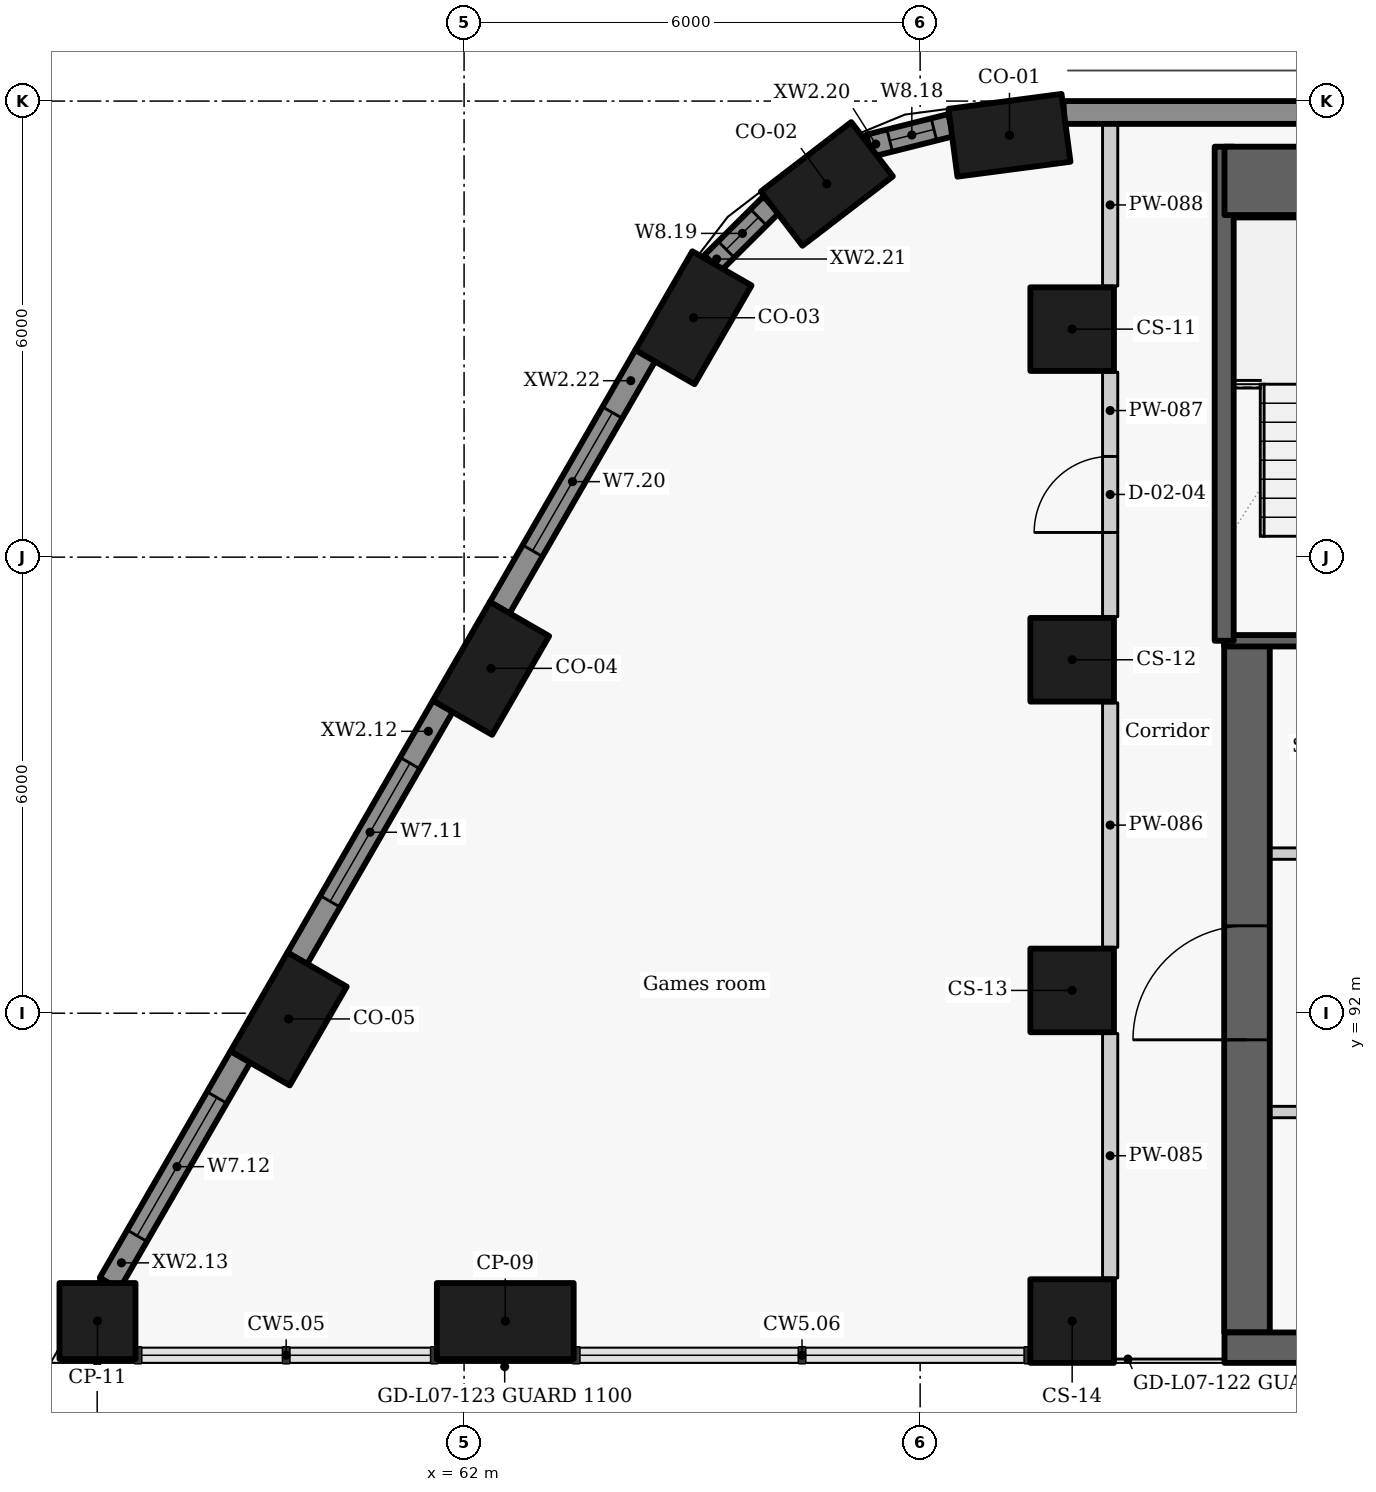
"""IFC4 building model, lengths in metres.
Left out: names, types, materials, properties, quantities, classifications, styles, units other than length and angle.
Written with IfcOpenShell. Run it as: python <this file> out.ifc"""

import sys

from ifc_helpers import new_model, si_unit, direction, frame, frame_2d, origin, origin_2d, place, context, subcontext, project, spatial, rectangle, extrude, element, fill, save


model = new_model("IFC4")
c1 = context("Model", 3, precision=1e-05, world=origin(), true_north=direction((0.0, 1.0)))
c2 = subcontext(c1, "Body", "Model", "MODEL_VIEW")
j1 = project(units=[si_unit("LENGTHUNIT", "METRE"), si_unit("PLANEANGLEUNIT", "RADIAN")], contexts=[c1])
p1 = place(None, origin())
s1 = spatial("IfcSite", under=j1, at=p1, CompositionType="ELEMENT")
p2 = place(p1, origin())
s2 = spatial("IfcBuilding", under=s1, at=p2, CompositionType="ELEMENT")
p3 = place(p2, frame((0.0, 0.0, 31.5)))
s3 = spatial("IfcBuildingStorey", under=s2, at=p3, CompositionType="ELEMENT", Elevation=31.5)
for number, where, z_axis, x_axis in (
    (1, (69.175, 103.55, 0.0), (0.0, 0.0, 1.0), (-0.991, -0.131, 0.0)),
    (2, (66.773, 102.91, 0.0), (0.0, 0.0, 1.0), (-0.793, -0.609, 0.0)),
    (3, (65.018, 101.149, 0.0), (0.0, 0.0, 1.0), (-0.5, -0.866, 0.0)),
    (4, (62.354, 96.537, 0.0), (0.0, 0.0, 1.0), (-0.5, -0.866, 0.0)),
    (5, (59.692, 91.925, 0.0), (0.0, 0.0, 1.0), (-0.5, -0.866, 0.0)),
):
    element("IfcColumn", number, at=place(p3, frame(where, z_axis=z_axis, x_axis=x_axis)), inside=s3, PredefinedType="COLUMN", context=c2, shape_type="SweptSolid", body=[
        extrude(rectangle(XDim=1.5, YDim=0.9, at=origin_2d()), origin(), (0.0, 0.0, 1.0), 3.3),
    ])
for number, where, z_axis, x_axis in (
    (6, (70.0, 101.0, 0.0), (0.0, 0.0, 1.0), (0.0, -1.0, 0.0)),
    (7, (70.0, 96.65, 0.0), (0.0, 0.0, 1.0), (0.0, -1.0, 0.0)),
    (8, (70.0, 92.3, 0.0), (0.0, 0.0, 1.0), (0.0, -1.0, 0.0)),
    (9, (70.0, 87.95, 0.0), (0.0, 0.0, 1.0), (0.0, -1.0, 0.0)),
):
    element("IfcColumn", number, at=place(p3, frame(where, z_axis=z_axis, x_axis=x_axis)), inside=s3, PredefinedType="COLUMN", context=c2, shape_type="SweptSolid", body=[
        extrude(rectangle(XDim=1.1, YDim=1.1, at=origin_2d()), origin(), (0.0, 0.0, 1.0), 3.3),
    ])
p4 = place(p3, frame((62.542, 87.95, 0.0), z_axis=(0.0, 0.0, 1.0), x_axis=(1.0, 0.0, 0.0)))
e10 = element("IfcColumn", 10, at=p4, inside=s3, PredefinedType="COLUMN", context=c2, shape_type="SweptSolid", body=[
    extrude(rectangle(XDim=1.8, YDim=1.0, at=origin_2d()), origin(), (0.0, 0.0, 1.0), 3.3),
])
p5 = place(p3, frame((57.177, 87.95, 0.0), z_axis=(0.0, 0.0, 1.0), x_axis=(1.0, 0.0, 0.0)))
e11 = element("IfcColumn", 11, at=p5, inside=s3, PredefinedType="COLUMN", context=c2, shape_type="SweptSolid", body=[
    extrude(rectangle(XDim=1.0, YDim=1.0, at=origin_2d()), origin(), (0.0, 0.0, 1.0), 3.3),
])
p6 = place(p3, frame((61.722, 96.041, 0.0), z_axis=(0.0, 0.0, 1.0), x_axis=(-0.500001735503, -0.866024401789, 0.0)))
e12 = element("IfcWall", 12, at=p6, inside=s3, PredefinedType="SOLIDWALL", context=c2, shape_type="SweptSolid", body=[
    extrude(rectangle(XDim=3.834, YDim=0.3, at=frame_2d((1.917, 0.0))), origin(), (0.0, 0.0, 1.0), 2.425),
])
p7 = place(p6, frame((0.867, 0.0, 0.9)))
e13 = element("IfcOpeningElement", 13, at=p7, cuts=e12, PredefinedType="OPENING", context=c2, shape_type="SweptSolid", body=[
    extrude(rectangle(XDim=2.1, YDim=1.1, at=frame_2d((1.05, 0.55))), frame((0.0, 0.16, 0.0), z_axis=(0.0, -1.0, 0.0), x_axis=(1.0, 0.0, 0.0)), (0.0, 0.0, 1.0), 0.32),
])
p8 = place(p3, frame((59.059, 91.429, 0.0), z_axis=(0.0, 0.0, 1.0), x_axis=(-0.500035437112, -0.866004943191, 0.0)))
e14 = element("IfcWall", 14, at=p8, inside=s3, PredefinedType="SOLIDWALL", context=c2, shape_type="SweptSolid", body=[
    extrude(rectangle(XDim=3.444, YDim=0.3, at=frame_2d((1.722, 0.0))), origin(), (0.0, 0.0, 1.0), 2.425),
])
p9 = place(p8, frame((0.621, 0.0, 0.9)))
e15 = element("IfcOpeningElement", 15, at=p9, cuts=e14, PredefinedType="OPENING", context=c2, shape_type="SweptSolid", body=[
    extrude(rectangle(XDim=2.1, YDim=1.1, at=frame_2d((1.05, 0.55))), frame((0.0, 0.16, 0.0), z_axis=(0.0, -1.0, 0.0), x_axis=(1.0, 0.0, 0.0)), (0.0, 0.0, 1.0), 0.32),
])
p10 = place(p3, frame((90.079, 103.85, 0.0), z_axis=(0.0, 0.0, 1.0), x_axis=(-1.0, 0.0, 0.0)))
e16 = element("IfcWall", 16, at=p10, inside=s3, PredefinedType="SOLIDWALL", context=c2, shape_type="SweptSolid", body=[
    extrude(rectangle(XDim=20.19, YDim=0.3, at=frame_2d((10.095, 0.0))), origin(), (0.0, 0.0, 1.0), 2.425),
])
p11 = place(p3, frame((68.405, 103.683, 0.0), z_axis=(0.0, 0.0, 1.0), x_axis=(-0.969766298956, -0.244035500304, 0.0)))
e17 = element("IfcWall", 17, at=p11, inside=s3, PredefinedType="SOLIDWALL", context=c2, shape_type="SweptSolid", body=[
    extrude(rectangle(XDim=1.111, YDim=0.3, at=frame_2d((0.555, 0.0))), origin(), (0.0, 0.0, 1.0), 2.425),
])
p12 = place(p11, frame((0.231, 0.0, 0.9)))
e18 = element("IfcOpeningElement", 18, at=p12, cuts=e17, PredefinedType="OPENING", context=c2, shape_type="SweptSolid", body=[
    extrude(rectangle(XDim=0.6, YDim=1.1, at=frame_2d((0.3, 0.55))), frame((0.0, 0.16, 0.0), z_axis=(0.0, -1.0, 0.0), x_axis=(1.0, 0.0, 0.0)), (0.0, 0.0, 1.0), 0.32),
])
p13 = place(p3, frame((66.042, 102.637, 0.0), z_axis=(0.0, 0.0, 1.0), x_axis=(-0.708892395813, -0.705316646024, 0.0)))
e19 = element("IfcWall", 19, at=p13, inside=s3, PredefinedType="SOLIDWALL", context=c2, shape_type="SweptSolid", body=[
    extrude(rectangle(XDim=1.093, YDim=0.3, at=frame_2d((0.546, 0.0))), origin(), (0.0, 0.0, 1.0), 2.425),
])
p14 = place(p13, frame((0.236, 0.0, 0.9)))
e20 = element("IfcOpeningElement", 20, at=p14, cuts=e19, PredefinedType="OPENING", context=c2, shape_type="SweptSolid", body=[
    extrude(rectangle(XDim=0.6, YDim=1.1, at=frame_2d((0.3, 0.55))), frame((0.0, 0.16, 0.0), z_axis=(0.0, -1.0, 0.0), x_axis=(1.0, 0.0, 0.0)), (0.0, 0.0, 1.0), 0.32),
])
p15 = place(p3, frame((64.385, 100.654, 0.0), z_axis=(0.0, 0.0, 1.0), x_axis=(-0.499974163209, -0.866040320149, 0.0)))
e21 = element("IfcWall", 21, at=p15, inside=s3, PredefinedType="SOLIDWALL", context=c2, shape_type="SweptSolid", body=[
    extrude(rectangle(XDim=3.834, YDim=0.3, at=frame_2d((1.917, 0.0))), origin(), (0.0, 0.0, 1.0), 2.425),
])
p16 = place(p15, frame((0.867, 0.0, 0.9)))
e22 = element("IfcOpeningElement", 22, at=p16, cuts=e21, PredefinedType="OPENING", context=c2, shape_type="SweptSolid", body=[
    extrude(rectangle(XDim=2.1, YDim=1.1, at=frame_2d((1.05, 0.55))), frame((0.0, 0.16, 0.0), z_axis=(0.0, -1.0, 0.0), x_axis=(1.0, 0.0, 0.0)), (0.0, 0.0, 1.0), 0.32),
])
p17 = place(p3, frame((74.6, 90.7, 0.0), z_axis=(0.0, 0.0, 1.0), x_axis=(-1.0, 0.0, 0.0)))
e23 = element("IfcWall", 23, at=p17, inside=s3, PredefinedType="PARTITIONING", context=c2, shape_type="SweptSolid", body=[
    extrude(rectangle(XDim=2.6, YDim=0.15, at=frame_2d((1.3, 0.0))), origin(), (0.0, 0.0, 1.0), 3.025),
])
p18 = place(p17, frame((0.525, 0.0, 0.0)))
e24 = element("IfcOpeningElement", 24, at=p18, cuts=e23, PredefinedType="OPENING", context=c2, shape_type="SweptSolid", body=[
    extrude(rectangle(XDim=0.9, YDim=2.1, at=frame_2d((0.45, 1.05))), frame((0.0, 0.085, 0.0), z_axis=(0.0, -1.0, 0.0), x_axis=(1.0, 0.0, 0.0)), (0.0, 0.0, 1.0), 0.17),
])
p19 = place(p3, frame((72.3, 87.8, -0.275), z_axis=(0.0, 0.0, 1.0), x_axis=(0.0, 1.0, 0.0)))
e25 = element("IfcWall", 25, at=p19, inside=s3, PredefinedType="SHEAR", context=c2, shape_type="SweptSolid", body=[
    extrude(rectangle(XDim=9.1, YDim=0.6, at=frame_2d((4.55, 0.0))), origin(), (0.0, 0.0, 1.0), 3.3),
])
p20 = place(p19, frame((3.85, 0.0, 0.275)))
e26 = element("IfcOpeningElement", 26, at=p20, cuts=e25, PredefinedType="OPENING", context=c2, shape_type="SweptSolid", body=[
    extrude(rectangle(XDim=1.5, YDim=2.1, at=frame_2d((0.75, 1.05))), frame((0.0, 0.31, 0.0), z_axis=(0.0, -1.0, 0.0), x_axis=(1.0, 0.0, 0.0)), (0.0, 0.0, 1.0), 0.62),
])
p21 = place(p3, frame((72.0, 94.1, 0.0), z_axis=(0.0, 0.0, 1.0), x_axis=(1.0, 0.0, 0.0)))
e27 = element("IfcWall", 27, at=p21, inside=s3, PredefinedType="PARTITIONING", context=c2, shape_type="SweptSolid", body=[
    extrude(rectangle(XDim=2.603, YDim=0.15, at=frame_2d((1.302, 0.0))), origin(), (0.0, 0.0, 1.0), 3.025),
])
p22 = place(p21, frame((1.075, 0.0, 0.0)))
e28 = element("IfcOpeningElement", 28, at=p22, cuts=e27, PredefinedType="OPENING", context=c2, shape_type="SweptSolid", body=[
    extrude(rectangle(XDim=1.1, YDim=2.1, at=frame_2d((0.55, 1.05))), frame((0.0, 0.085, 0.0), z_axis=(0.0, -1.0, 0.0), x_axis=(1.0, 0.0, 0.0)), (0.0, 0.0, 1.0), 0.17),
])
p23 = place(p3, frame((74.6, 96.9, -0.275), z_axis=(0.0, 0.0, 1.0), x_axis=(-1.0, 0.0, 0.0)))
e29 = element("IfcWall", 29, at=p23, inside=s3, PredefinedType="SHEAR", context=c2, shape_type="SweptSolid", body=[
    extrude(rectangle(XDim=2.6, YDim=0.15, at=frame_2d((1.3, 0.0))), origin(), (0.0, 0.0, 1.0), 3.3),
])
p24 = place(p23, frame((0.37, 0.0, 0.275)))
e30 = element("IfcOpeningElement", 30, at=p24, cuts=e29, PredefinedType="OPENING", context=c2, shape_type="SweptSolid", body=[
    extrude(rectangle(XDim=1.1, YDim=2.1, at=frame_2d((0.55, 1.05))), frame((0.0, 0.085, 0.0), z_axis=(0.0, -1.0, 0.0), x_axis=(1.0, 0.0, 0.0)), (0.0, 0.0, 1.0), 0.17),
])
p25 = place(p3, frame((72.0, 96.9, -0.275), z_axis=(0.0, 0.0, 1.0), x_axis=(0.0, 1.0, 0.0)))
e31 = element("IfcWall", 31, at=p25, inside=s3, PredefinedType="SHEAR", context=c2, shape_type="SweptSolid", body=[
    extrude(rectangle(XDim=6.5, YDim=0.25, at=frame_2d((3.25, 0.0))), origin(), (0.0, 0.0, 1.0), 3.3),
])
p26 = place(p3, frame((70.5, 88.517, 0.0), z_axis=(0.0, 0.0, 1.0), x_axis=(0.0, 1.0, 0.0)))
e32 = element("IfcWall", 32, at=p26, inside=s3, PredefinedType="PARTITIONING", context=c2, shape_type="SweptSolid", body=[
    extrude(rectangle(XDim=3.216, YDim=0.2, at=frame_2d((1.608, 0.0))), origin(), (0.0, 0.0, 1.0), 3.025),
])
p27 = place(p3, frame((70.5, 92.867, 0.0), z_axis=(0.0, 0.0, 1.0), x_axis=(0.0, 1.0, 0.0)))
e33 = element("IfcWall", 33, at=p27, inside=s3, PredefinedType="PARTITIONING", context=c2, shape_type="SweptSolid", body=[
    extrude(rectangle(XDim=3.216, YDim=0.2, at=frame_2d((1.608, 0.0))), origin(), (0.0, 0.0, 1.0), 3.025),
])
p28 = place(p3, frame((70.5, 97.217, 0.0), z_axis=(0.0, 0.0, 1.0), x_axis=(0.0, 1.0, 0.0)))
e34 = element("IfcWall", 34, at=p28, inside=s3, PredefinedType="PARTITIONING", context=c2, shape_type="SweptSolid", body=[
    extrude(rectangle(XDim=3.216, YDim=0.2, at=frame_2d((1.608, 0.0))), origin(), (0.0, 0.0, 1.0), 3.025),
])
p29 = place(p28, frame((1.108, 0.0, 0.0)))
e35 = element("IfcOpeningElement", 35, at=p29, cuts=e34, PredefinedType="OPENING", context=c2, shape_type="SweptSolid", body=[
    extrude(rectangle(XDim=1.0, YDim=2.1, at=frame_2d((0.5, 1.05))), frame((0.0, 0.11, 0.0), z_axis=(0.0, -1.0, 0.0), x_axis=(1.0, 0.0, 0.0)), (0.0, 0.0, 1.0), 0.22),
])
p30 = place(p3, frame((70.5, 101.567, 0.0), z_axis=(0.0, 0.0, 1.0), x_axis=(0.0, 1.0, 0.0)))
e36 = element("IfcWall", 36, at=p30, inside=s3, PredefinedType="PARTITIONING", context=c2, shape_type="SweptSolid", body=[
    extrude(rectangle(XDim=2.133, YDim=0.2, at=frame_2d((1.066, 0.0))), origin(), (0.0, 0.0, 1.0), 3.025),
])
p31 = place(p3, frame((72.004, 87.6, -0.275), z_axis=(0.0, 0.0, 1.0), x_axis=(1.0, 0.0, 0.0)))
e37 = element("IfcWall", 37, at=p31, inside=s3, PredefinedType="SHEAR", context=c2, shape_type="SweptSolid", body=[
    extrude(rectangle(XDim=15.992, YDim=0.4, at=frame_2d((7.996, 0.0))), origin(), (0.0, 0.0, 1.0), 3.3),
])
p32 = place(p3, frame((72.004, 102.95, -0.275), z_axis=(0.0, 0.0, 1.0), x_axis=(1.0, 0.0, 0.0)))
e38 = element("IfcWall", 38, at=p32, inside=s3, PredefinedType="SHEAR", context=c2, shape_type="SweptSolid", body=[
    extrude(rectangle(XDim=15.992, YDim=0.9, at=frame_2d((7.996, 0.0))), origin(), (0.0, 0.0, 1.0), 3.3),
])
p33 = place(p7, origin())
e39 = element("IfcWindow", 39, at=p33, inside=s3, PartitioningType="SINGLE_PANEL", PredefinedType="WINDOW", context=c2, shape_type="SweptSolid", body=[
    extrude(rectangle(XDim=2.1, YDim=1.1, at=frame_2d((1.05, 0.55))), frame((0.0, 0.03, 0.0), z_axis=(0.0, -1.0, 0.0), x_axis=(1.0, 0.0, 0.0)), (0.0, 0.0, 1.0), 0.06),
])
fill(e13, e39)
p34 = place(p9, origin())
e40 = element("IfcWindow", 40, at=p34, inside=s3, PartitioningType="SINGLE_PANEL", PredefinedType="WINDOW", context=c2, shape_type="SweptSolid", body=[
    extrude(rectangle(XDim=2.1, YDim=1.1, at=frame_2d((1.05, 0.55))), frame((0.0, 0.03, 0.0), z_axis=(0.0, -1.0, 0.0), x_axis=(1.0, 0.0, 0.0)), (0.0, 0.0, 1.0), 0.06),
])
fill(e15, e40)
p35 = place(p12, origin())
e41 = element("IfcWindow", 41, at=p35, inside=s3, PartitioningType="SINGLE_PANEL", PredefinedType="WINDOW", context=c2, shape_type="SweptSolid", body=[
    extrude(rectangle(XDim=0.6, YDim=1.1, at=frame_2d((0.3, 0.55))), frame((0.0, 0.03, 0.0), z_axis=(0.0, -1.0, 0.0), x_axis=(1.0, 0.0, 0.0)), (0.0, 0.0, 1.0), 0.06),
])
fill(e18, e41)
p36 = place(p14, origin())
e42 = element("IfcWindow", 42, at=p36, inside=s3, PartitioningType="SINGLE_PANEL", PredefinedType="WINDOW", context=c2, shape_type="SweptSolid", body=[
    extrude(rectangle(XDim=0.6, YDim=1.1, at=frame_2d((0.3, 0.55))), frame((0.0, 0.03, 0.0), z_axis=(0.0, -1.0, 0.0), x_axis=(1.0, 0.0, 0.0)), (0.0, 0.0, 1.0), 0.06),
])
fill(e20, e42)
p37 = place(p16, origin())
e43 = element("IfcWindow", 43, at=p37, inside=s3, PartitioningType="SINGLE_PANEL", PredefinedType="WINDOW", context=c2, shape_type="SweptSolid", body=[
    extrude(rectangle(XDim=2.1, YDim=1.1, at=frame_2d((1.05, 0.55))), frame((0.0, 0.03, 0.0), z_axis=(0.0, -1.0, 0.0), x_axis=(1.0, 0.0, 0.0)), (0.0, 0.0, 1.0), 0.06),
])
fill(e22, e43)
p38 = place(p29, origin())
e44 = element("IfcDoor", 44, at=p38, inside=s3, OperationType="SINGLE_SWING_LEFT", PredefinedType="DOOR", context=c2, shape_type="SweptSolid", body=[
    extrude(rectangle(XDim=1.0, YDim=2.1, at=frame_2d((0.5, 1.05))), frame((0.0, 0.025, 0.0), z_axis=(0.0, -1.0, 0.0), x_axis=(1.0, 0.0, 0.0)), (0.0, 0.0, 1.0), 0.05),
])
fill(e35, e44)
p39 = place(p20, origin())
e45 = element("IfcDoor", 45, at=p39, inside=s3, OperationType="DOUBLE_DOOR_SINGLE_SWING", PredefinedType="DOOR", context=c2, shape_type="SweptSolid", body=[
    extrude(rectangle(XDim=1.5, YDim=2.1, at=frame_2d((0.75, 1.05))), frame((0.0, 0.025, 0.0), z_axis=(0.0, -1.0, 0.0), x_axis=(1.0, 0.0, 0.0)), (0.0, 0.0, 1.0), 0.05),
])
fill(e26, e45)
save(model, sys.argv[1])
